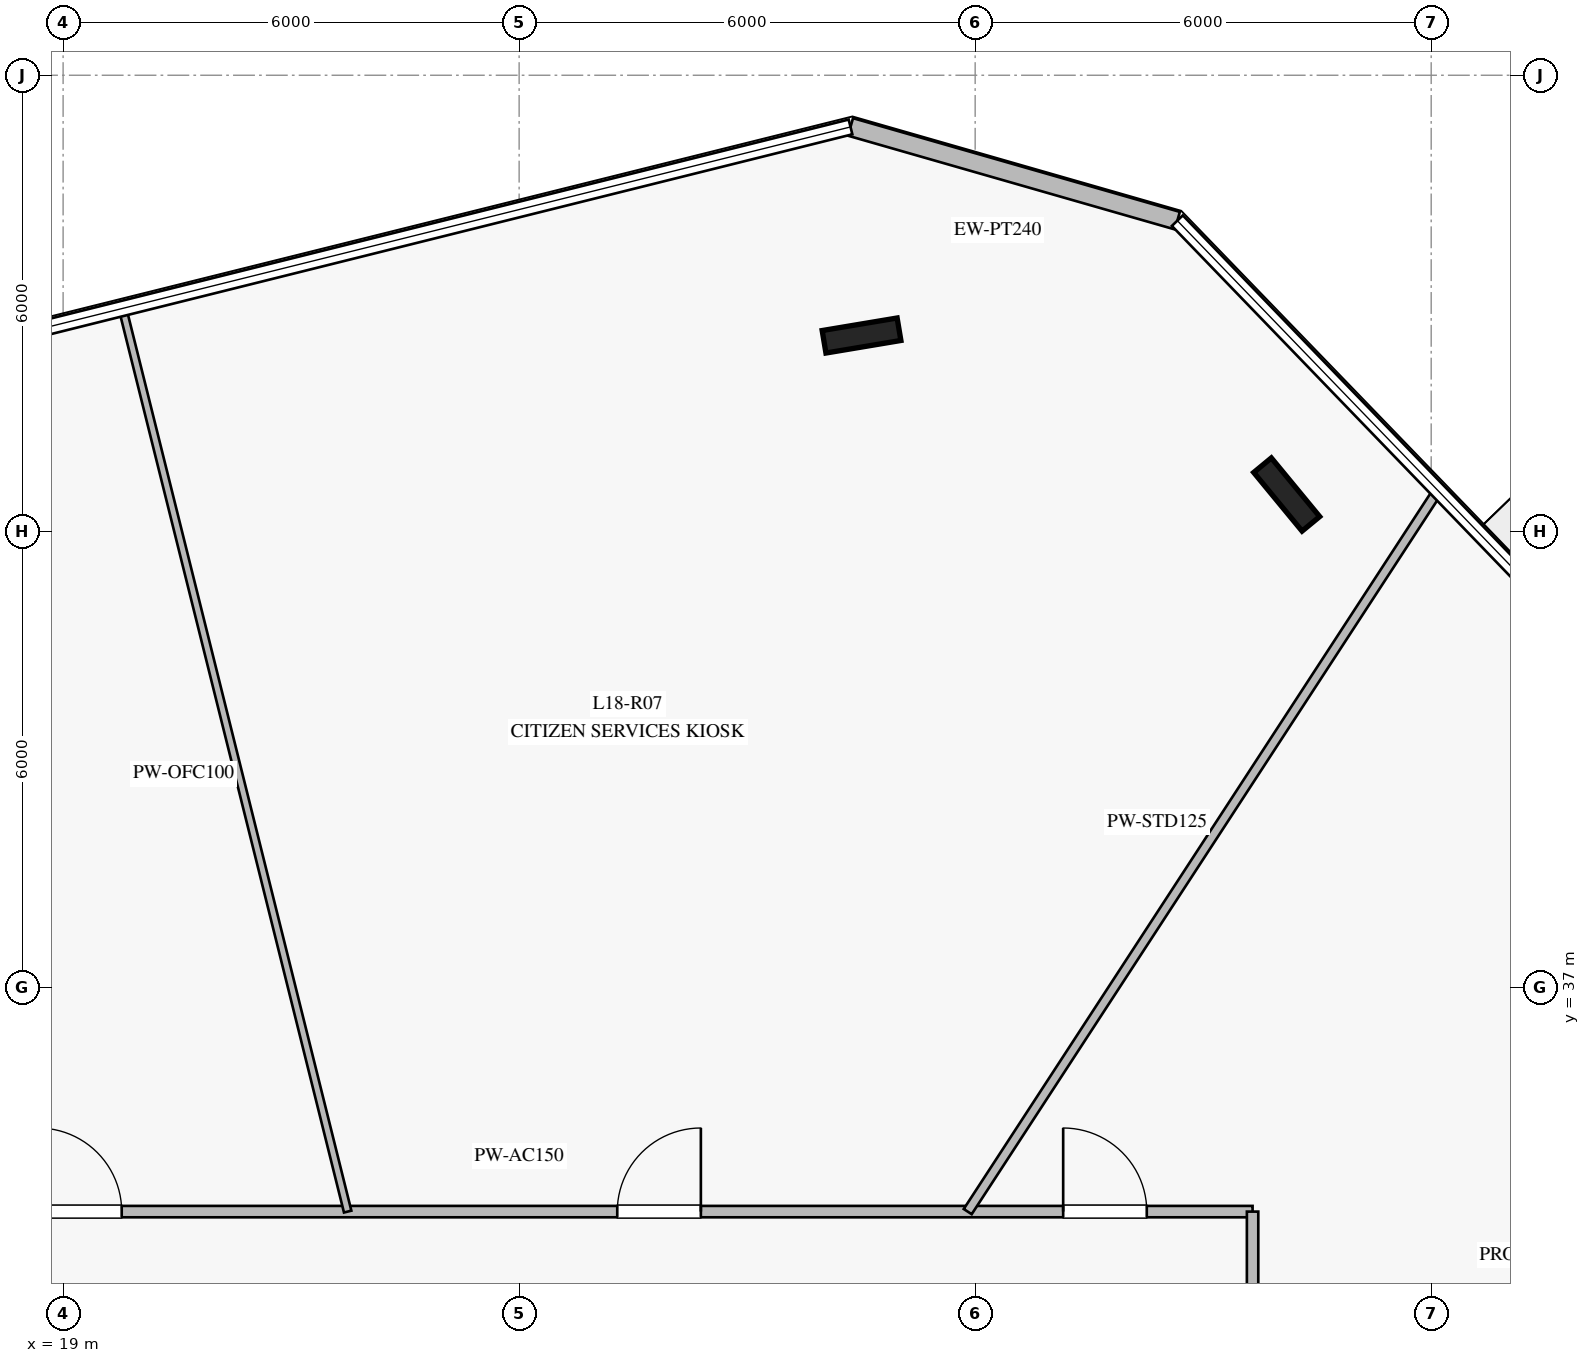
"""IFC4 building model, lengths in metres.
Left out: names, types, materials, properties, quantities, classifications, styles, units other than length and angle.
Written with IfcOpenShell. Run it as: python <this file> out.ifc"""

import sys

from ifc_helpers import new_model, si_unit, direction, frame, frame_2d, origin, origin_2d, place, context, subcontext, project, spatial, rectangle, i_section, extrude, element, fill, save


model = new_model("IFC4")
c1 = context("Model", 3, precision=1e-05, world=origin(), true_north=direction((0.0, 1.0)))
c2 = subcontext(c1, "Body", "Model", "MODEL_VIEW")
j1 = project(units=[si_unit("LENGTHUNIT", "METRE"), si_unit("PLANEANGLEUNIT", "RADIAN")], contexts=[c1])
p1 = place(None, origin())
s1 = spatial("IfcSite", under=j1, at=p1, CompositionType="ELEMENT")
p2 = place(p1, origin())
s2 = spatial("IfcBuilding", under=s1, at=p2, CompositionType="ELEMENT")
p3 = place(p2, frame((0.0, 0.0, 76.0)))
s3 = spatial("IfcBuildingStorey", under=s2, at=p3, CompositionType="ELEMENT", Elevation=76.0)
for number, where, z_axis, x_axis in (
    (1, (35.099, 43.484, 0.0), (0.0, 0.0, 1.0), (-0.636, 0.772, 0.0)),
    (2, (29.505, 45.576, 0.0), (0.0, 0.0, 1.0), (0.986, 0.165, 0.0)),
):
    element("IfcColumn", number, at=place(p3, frame(where, z_axis=z_axis, x_axis=x_axis)), inside=s3, PredefinedType="COLUMN", context=c2, shape_type="SweptSolid", body=[
        extrude(i_section(OverallWidth=0.3, OverallDepth=1.0, WebThickness=0.019, FlangeThickness=0.036, at=origin_2d()), origin(), (0.0, 0.0, 1.0), 4.0),
    ])
p4 = place(p3, frame((33.66, 47.087, 0.0), z_axis=(0.0, 0.0, 1.0), x_axis=(-0.96124954367, 0.275679732289, 0.0)))
e3 = element("IfcWall", 3, at=p4, inside=s3, PredefinedType="STANDARD", context=c2, shape_type="SweptSolid", body=[
    extrude(rectangle(XDim=4.473, YDim=0.24, at=frame_2d((2.237, 0.0))), origin(), (0.0, 0.0, 1.0), 3.76),
])
p5 = place(p3, frame((15.35, 34.05, 0.0), z_axis=(0.0, 0.0, 1.0), x_axis=(1.0, 0.0, 0.0)))
e4 = element("IfcWall", 4, at=p5, inside=s3, PredefinedType="PARTITIONING", context=c2, shape_type="SweptSolid", body=[
    extrude(rectangle(XDim=19.3, YDim=0.15, at=frame_2d((9.65, 0.0))), origin(), (0.0, 0.0, 1.0), 3.21),
])
p6 = place(p5, frame((16.808, 0.0, 0.0)))
e5 = element("IfcOpeningElement", 5, at=p6, cuts=e4, PredefinedType="OPENING", context=c2, shape_type="SweptSolid", body=[
    extrude(rectangle(XDim=1.1, YDim=2.2, at=frame_2d((0.55, 1.1))), frame((0.0, 0.085, 0.0), z_axis=(0.0, -1.0, 0.0), x_axis=(1.0, 0.0, 0.0)), (0.0, 0.0, 1.0), 0.17),
])
p7 = place(p5, frame((10.941, 0.0, 0.0)))
e6 = element("IfcOpeningElement", 6, at=p7, cuts=e4, PredefinedType="OPENING", context=c2, shape_type="SweptSolid", body=[
    extrude(rectangle(XDim=1.1, YDim=2.2, at=frame_2d((0.55, 1.1))), frame((0.0, 0.085, 0.0), z_axis=(0.0, -1.0, 0.0), x_axis=(1.0, 0.0, 0.0)), (0.0, 0.0, 1.0), 0.17),
])
p8 = place(p5, frame((3.321, 0.0, 0.0)))
e7 = element("IfcOpeningElement", 7, at=p8, cuts=e4, PredefinedType="OPENING", context=c2, shape_type="SweptSolid", body=[
    extrude(rectangle(XDim=1.1, YDim=2.2, at=frame_2d((0.55, 1.1))), frame((0.0, 0.085, 0.0), z_axis=(0.0, -1.0, 0.0), x_axis=(1.0, 0.0, 0.0)), (0.0, 0.0, 1.0), 0.17),
])
p9 = place(p3, frame((34.65, 34.05, 0.0), z_axis=(0.0, 0.0, 1.0), x_axis=(0.0, -1.0, 0.0)))
e8 = element("IfcWall", 8, at=p9, inside=s3, PredefinedType="PARTITIONING", context=c2, shape_type="SweptSolid", body=[
    extrude(rectangle(XDim=18.1, YDim=0.15, at=frame_2d((9.05, 0.0))), origin(), (0.0, 0.0, 1.0), 3.21),
])
p10 = place(p9, frame((13.106, 0.0, 0.0)))
e9 = element("IfcOpeningElement", 9, at=p10, cuts=e8, PredefinedType="OPENING", context=c2, shape_type="SweptSolid", body=[
    extrude(rectangle(XDim=1.1, YDim=2.2, at=frame_2d((0.55, 1.1))), frame((0.0, 0.085, 0.0), z_axis=(0.0, -1.0, 0.0), x_axis=(1.0, 0.0, 0.0)), (0.0, 0.0, 1.0), 0.17),
])
p11 = place(p3, frame((30.902, 34.05, 0.0), z_axis=(0.0, 0.0, 1.0), x_axis=(0.54628622195, 0.837598569547, 0.0)))
e10 = element("IfcWall", 10, at=p11, inside=s3, PredefinedType="PARTITIONING", context=c2, shape_type="SweptSolid", body=[
    extrude(rectangle(XDim=11.307, YDim=0.125, at=frame_2d((5.654, 0.0))), origin(), (0.0, 0.0, 1.0), 3.05),
])
p12 = place(p3, frame((22.744, 34.05, 0.0), z_axis=(0.0, 0.0, 1.0), x_axis=(-0.241901376607, 0.970300842005, 0.0)))
e11 = element("IfcWall", 11, at=p12, inside=s3, PredefinedType="MOVABLE", context=c2, shape_type="SweptSolid", body=[
    extrude(rectangle(XDim=12.228, YDim=0.1, at=frame_2d((6.114, 0.0))), origin(), (0.0, 0.0, 1.0), 3.06),
])
p13 = place(p6, origin())
e12 = element("IfcDoor", 12, at=p13, inside=s3, OperationType="SINGLE_SWING_LEFT", PredefinedType="DOOR", context=c2, shape_type="SweptSolid", body=[
    extrude(rectangle(XDim=1.1, YDim=2.2, at=frame_2d((0.55, 1.1))), frame((0.0, 0.025, 0.0), z_axis=(0.0, -1.0, 0.0), x_axis=(1.0, 0.0, 0.0)), (0.0, 0.0, 1.0), 0.05),
])
fill(e5, e12)
p14 = place(p7, origin())
e13 = element("IfcDoor", 13, at=p14, inside=s3, OperationType="SINGLE_SWING_RIGHT", PredefinedType="DOOR", context=c2, shape_type="SweptSolid", body=[
    extrude(rectangle(XDim=1.1, YDim=2.2, at=frame_2d((0.55, 1.1))), frame((0.0, 0.025, 0.0), z_axis=(0.0, -1.0, 0.0), x_axis=(1.0, 0.0, 0.0)), (0.0, 0.0, 1.0), 0.05),
])
fill(e6, e13)
p15 = place(p8, origin())
e14 = element("IfcDoor", 14, at=p15, inside=s3, OperationType="SINGLE_SWING_LEFT", PredefinedType="DOOR", context=c2, shape_type="SweptSolid", body=[
    extrude(rectangle(XDim=1.1, YDim=2.2, at=frame_2d((0.55, 1.1))), frame((0.0, 0.025, 0.0), z_axis=(0.0, -1.0, 0.0), x_axis=(1.0, 0.0, 0.0)), (0.0, 0.0, 1.0), 0.05),
])
fill(e7, e14)
save(model, sys.argv[1])
